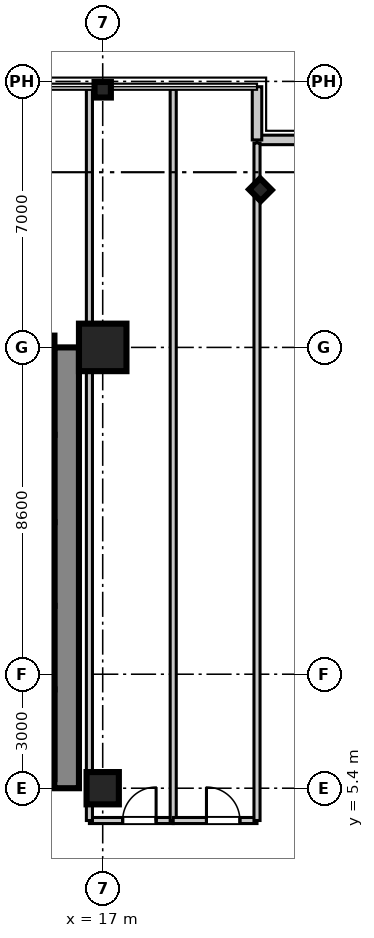
"""IFC4 building model, lengths in metres.
Left out: names, types, materials, properties, quantities, classifications, styles, units other than length and angle.
Written with IfcOpenShell. Run it as: python <this file> out.ifc"""

import sys

from ifc_helpers import new_model, si_unit, direction, frame, frame_2d, origin, origin_2d, place, context, subcontext, project, spatial, rectangle, i_section, extrude, source, transform, mapped, element, fill, save


model = new_model("IFC4")
c1 = context("Model", 3, precision=1e-05, world=origin(), true_north=direction((0.0, 1.0)))
c2 = subcontext(c1, "Body", "Model", "MODEL_VIEW")
j1 = project(units=[si_unit("LENGTHUNIT", "METRE"), si_unit("PLANEANGLEUNIT", "RADIAN")], contexts=[c1])
p1 = place(None, origin())
s1 = spatial("IfcSite", under=j1, at=p1, CompositionType="ELEMENT")
p2 = place(p1, origin())
s2 = spatial("IfcBuilding", under=s1, at=p2, CompositionType="ELEMENT")
p3 = place(p2, frame((0.0, 0.0, 124.8)))
s3 = spatial("IfcBuildingStorey", under=s2, at=p3, CompositionType="ELEMENT", Elevation=124.8)
m1 = source(origin(), c2, "Body", "SweptSolid", [
    extrude(rectangle(XDim=0.85, YDim=0.85, at=origin_2d()), origin(), (0.0, 0.0, 1.0), 3.605),
])
p4 = place(p3, frame((17.0, 5.4, 0.0), z_axis=(0.0, 0.0, 1.0), x_axis=(1.0, 0.0, 0.0)))
e1 = element("IfcColumn", 1, at=p4, inside=s3, PredefinedType="PILASTER", context=c2, shape_type="MappedRepresentation", body=[
    mapped(m1, transform((0.0, 0.0, 0.0), scale=1.0)),
])
m2 = source(origin(), c2, "Body", "SweptSolid", [
    extrude(rectangle(XDim=1.25, YDim=1.25, at=origin_2d()), origin(), (0.0, 0.0, 1.0), 3.605),
])
p5 = place(p3, frame((17.0, 17.0, 0.0), z_axis=(0.0, 0.0, 1.0), x_axis=(1.0, 0.0, 0.0)))
e2 = element("IfcColumn", 2, at=p5, inside=s3, PredefinedType="COLUMN", context=c2, shape_type="MappedRepresentation", body=[
    mapped(m2, transform((0.0, 0.0, 0.0), scale=1.0)),
])
m3 = source(origin(), c2, "Body", "SweptSolid", [
    extrude(i_section(OverallWidth=0.409, OverallDepth=0.43, WebThickness=0.021, FlangeThickness=0.034, at=origin_2d()), origin(), (0.0, 0.0, 1.0), 3.605),
])
for number, where, z_axis, x_axis in (
    (3, (17.0, 23.78, 0.0), (0.0, 0.0, 1.0), (0.0, 1.0, 0.0)),
    (4, (21.15, 21.15, 0.0), (0.0, 0.0, 1.0), (0.707, 0.707, 0.0)),
):
    element("IfcColumn", number, at=place(p3, frame(where, z_axis=z_axis, x_axis=x_axis)), inside=s3, PredefinedType="COLUMN", context=c2, shape_type="MappedRepresentation", body=[
        mapped(m3, transform((0.0, 0.0, 0.0), scale=1.0)),
    ])
m4 = source(origin(), c2, "Body", "SweptSolid", [
    extrude(rectangle(XDim=11.6, YDim=0.65, at=frame_2d((5.8, 0.0))), origin(), (0.0, 0.0, 1.0), 3.38),
])
p6 = place(p3, frame((16.05, 5.4, 0.0), z_axis=(0.0, 0.0, 1.0), x_axis=(0.0, 1.0, 0.0)))
e5 = element("IfcWall", 5, at=p6, inside=s3, PredefinedType="SHEAR", context=c2, shape_type="MappedRepresentation", body=[
    mapped(m4, transform((0.0, 0.0, 0.0), scale=1.0)),
])
m5 = source(origin(), c2, "Body", "SweptSolid", [
    extrude(rectangle(XDim=2.36, YDim=0.22, at=frame_2d((1.18, 0.0))), origin(), (0.0, 0.0, 1.0), 3.38),
])
p7 = place(p3, frame((15.62, 5.64, 0.0), z_axis=(0.0, 0.0, 1.0), x_axis=(0.0, 1.0, 0.0)))
e6 = element("IfcWall", 6, at=p7, inside=s3, PredefinedType="SHEAR", context=c2, shape_type="MappedRepresentation", body=[
    mapped(m5, transform((0.0, 0.0, 0.0), scale=1.0)),
])
m6 = source(origin(), c2, "Body", "SweptSolid", [
    extrude(rectangle(XDim=2.2, YDim=0.22, at=frame_2d((1.1, 0.0))), origin(), (0.0, 0.0, 1.0), 3.38),
])
for number, where, z_axis, x_axis in (
    (7, (15.62, 8.0, 0.0), (0.0, 0.0, 1.0), (0.0, 1.0, 0.0)),
    (8, (15.62, 10.2, 0.0), (0.0, 0.0, 1.0), (0.0, 1.0, 0.0)),
):
    element("IfcWall", number, at=place(p3, frame(where, z_axis=z_axis, x_axis=x_axis)), inside=s3, PredefinedType="SHEAR", context=c2, shape_type="MappedRepresentation", body=[
        mapped(m6, transform((0.0, 0.0, 0.0), scale=1.0)),
    ])
m7 = source(origin(), c2, "Body", "SweptSolid", [
    extrude(rectangle(XDim=2.3, YDim=0.22, at=frame_2d((1.15, 0.0))), origin(), (0.0, 0.0, 1.0), 3.38),
])
p8 = place(p3, frame((15.62, 12.4, 0.0), z_axis=(0.0, 0.0, 1.0), x_axis=(0.0, 1.0, 0.0)))
e9 = element("IfcWall", 9, at=p8, inside=s3, PredefinedType="SHEAR", context=c2, shape_type="MappedRepresentation", body=[
    mapped(m7, transform((0.0, 0.0, 0.0), scale=1.0)),
])
m8 = source(origin(), c2, "Body", "SweptSolid", [
    extrude(rectangle(XDim=2.61, YDim=0.22, at=frame_2d((1.305, 0.0))), origin(), (0.0, 0.0, 1.0), 3.38),
])
p9 = place(p3, frame((15.62, 14.7, 0.0), z_axis=(0.0, 0.0, 1.0), x_axis=(0.0, 1.0, 0.0)))
e10 = element("IfcWall", 10, at=p9, inside=s3, PredefinedType="SHEAR", context=c2, shape_type="MappedRepresentation", body=[
    mapped(m8, transform((0.0, 0.0, 0.0), scale=1.0)),
])
m9 = source(origin(), c2, "Body", "SweptSolid", [
    extrude(rectangle(XDim=1.4, YDim=0.25, at=frame_2d((0.7, 0.0))), origin(), (0.0, 0.0, 1.0), 3.38),
])
p10 = place(p3, frame((21.06, 22.46, 0.0), z_axis=(0.0, 0.0, 1.0), x_axis=(1.0, 0.0, 0.0)))
e11 = element("IfcWall", 11, at=p10, inside=s3, PredefinedType="STANDARD", context=c2, shape_type="MappedRepresentation", body=[
    mapped(m9, transform((0.0, 0.0, 0.0), scale=1.0)),
])
m10 = source(origin(), c2, "Body", "SweptSolid", [
    extrude(rectangle(XDim=1.4, YDim=0.25, at=frame_2d((0.7, 0.0))), origin(), (0.0, 0.0, 1.0), 3.38),
])
p11 = place(p3, frame((21.06, 22.46, 0.0), z_axis=(0.0, 0.0, 1.0), x_axis=(0.0, 1.0, 0.0)))
e12 = element("IfcWall", 12, at=p11, inside=s3, PredefinedType="STANDARD", context=c2, shape_type="MappedRepresentation", body=[
    mapped(m10, transform((0.0, 0.0, 0.0), scale=1.0)),
])
m11 = source(origin(), c2, "Body", "SweptSolid", [
    extrude(rectangle(XDim=2.205, YDim=0.16, at=frame_2d((1.103, 0.0))), origin(), (0.0, 0.0, 1.0), 2.72),
])
p12 = place(p3, frame((16.65, 4.55, 0.0), z_axis=(0.0, 0.0, 1.0), x_axis=(1.0, 0.0, 0.0)))
e13 = element("IfcWall", 13, at=p12, inside=s3, PredefinedType="PARTITIONING", context=c2, shape_type="MappedRepresentation", body=[
    mapped(m11, transform((0.0, 0.0, 0.0), scale=1.0)),
])
p13 = place(p12, frame((0.875, 0.0, 0.0)))
e14 = element("IfcOpeningElement", 14, at=p13, cuts=e13, PredefinedType="OPENING", context=c2, shape_type="SweptSolid", body=[
    extrude(rectangle(XDim=0.88, YDim=2.1, at=frame_2d((0.44, 1.05))), frame((0.0, 0.09, 0.0), z_axis=(0.0, -1.0, 0.0), x_axis=(1.0, 0.0, 0.0)), (0.0, 0.0, 1.0), 0.18),
])
m12 = source(origin(), c2, "Body", "SweptSolid", [
    extrude(rectangle(XDim=19.25, YDim=0.16, at=frame_2d((9.625, 0.0))), origin(), (0.0, 0.0, 1.0), 2.72),
])
for number, where, z_axis, x_axis in (
    (15, (16.65, 4.55, 0.0), (0.0, 0.0, 1.0), (0.0, 1.0, 0.0)),
    (16, (18.855, 4.55, 0.0), (0.0, 0.0, 1.0), (0.0, 1.0, 0.0)),
):
    element("IfcWall", number, at=place(p3, frame(where, z_axis=z_axis, x_axis=x_axis)), inside=s3, PredefinedType="PARTITIONING", context=c2, shape_type="MappedRepresentation", body=[
        mapped(m12, transform((0.0, 0.0, 0.0), scale=1.0)),
    ])
p14 = place(p3, frame((18.855, 4.55, 0.0), z_axis=(0.0, 0.0, 1.0), x_axis=(1.0, 0.0, 0.0)))
e17 = element("IfcWall", 17, at=p14, inside=s3, PredefinedType="PARTITIONING", context=c2, shape_type="MappedRepresentation", body=[
    mapped(m11, transform((0.0, 0.0, 0.0), scale=1.0)),
])
p15 = place(p14, frame((0.875, 0.0, 0.0)))
e18 = element("IfcOpeningElement", 18, at=p15, cuts=e17, PredefinedType="OPENING", context=c2, shape_type="SweptSolid", body=[
    extrude(rectangle(XDim=0.88, YDim=2.1, at=frame_2d((0.44, 1.05))), frame((0.0, 0.09, 0.0), z_axis=(0.0, -1.0, 0.0), x_axis=(1.0, 0.0, 0.0)), (0.0, 0.0, 1.0), 0.18),
])
m13 = source(origin(), c2, "Body", "SweptSolid", [
    extrude(rectangle(XDim=17.83, YDim=0.16, at=frame_2d((8.915, 0.0))), origin(), (0.0, 0.0, 1.0), 2.72),
])
p16 = place(p3, frame((21.06, 4.55, 0.0), z_axis=(0.0, 0.0, 1.0), x_axis=(0.0, 1.0, 0.0)))
e19 = element("IfcWall", 19, at=p16, inside=s3, PredefinedType="PARTITIONING", context=c2, shape_type="MappedRepresentation", body=[
    mapped(m13, transform((0.0, 0.0, 0.0), scale=1.0)),
])
m14 = source(origin(), c2, "Body", "SweptSolid", [
    extrude(rectangle(XDim=0.88, YDim=2.1, at=frame_2d((0.44, 1.05))), frame((0.0, 0.025, 0.0), z_axis=(0.0, -1.0, 0.0), x_axis=(1.0, 0.0, 0.0)), (0.0, 0.0, 1.0), 0.05),
])
p17 = place(p13, origin())
e20 = element("IfcDoor", 20, at=p17, inside=s3, OperationType="SINGLE_SWING_RIGHT", PredefinedType="DOOR", context=c2, shape_type="MappedRepresentation", body=[
    mapped(m14, transform((0.0, 0.0, 0.0), scale=1.0)),
])
fill(e14, e20)
p18 = place(p15, origin())
e21 = element("IfcDoor", 21, at=p18, inside=s3, OperationType="SINGLE_SWING_LEFT", PredefinedType="DOOR", context=c2, shape_type="MappedRepresentation", body=[
    mapped(m14, transform((0.0, 0.0, 0.0), scale=1.0)),
])
fill(e18, e21)
save(model, sys.argv[1])
